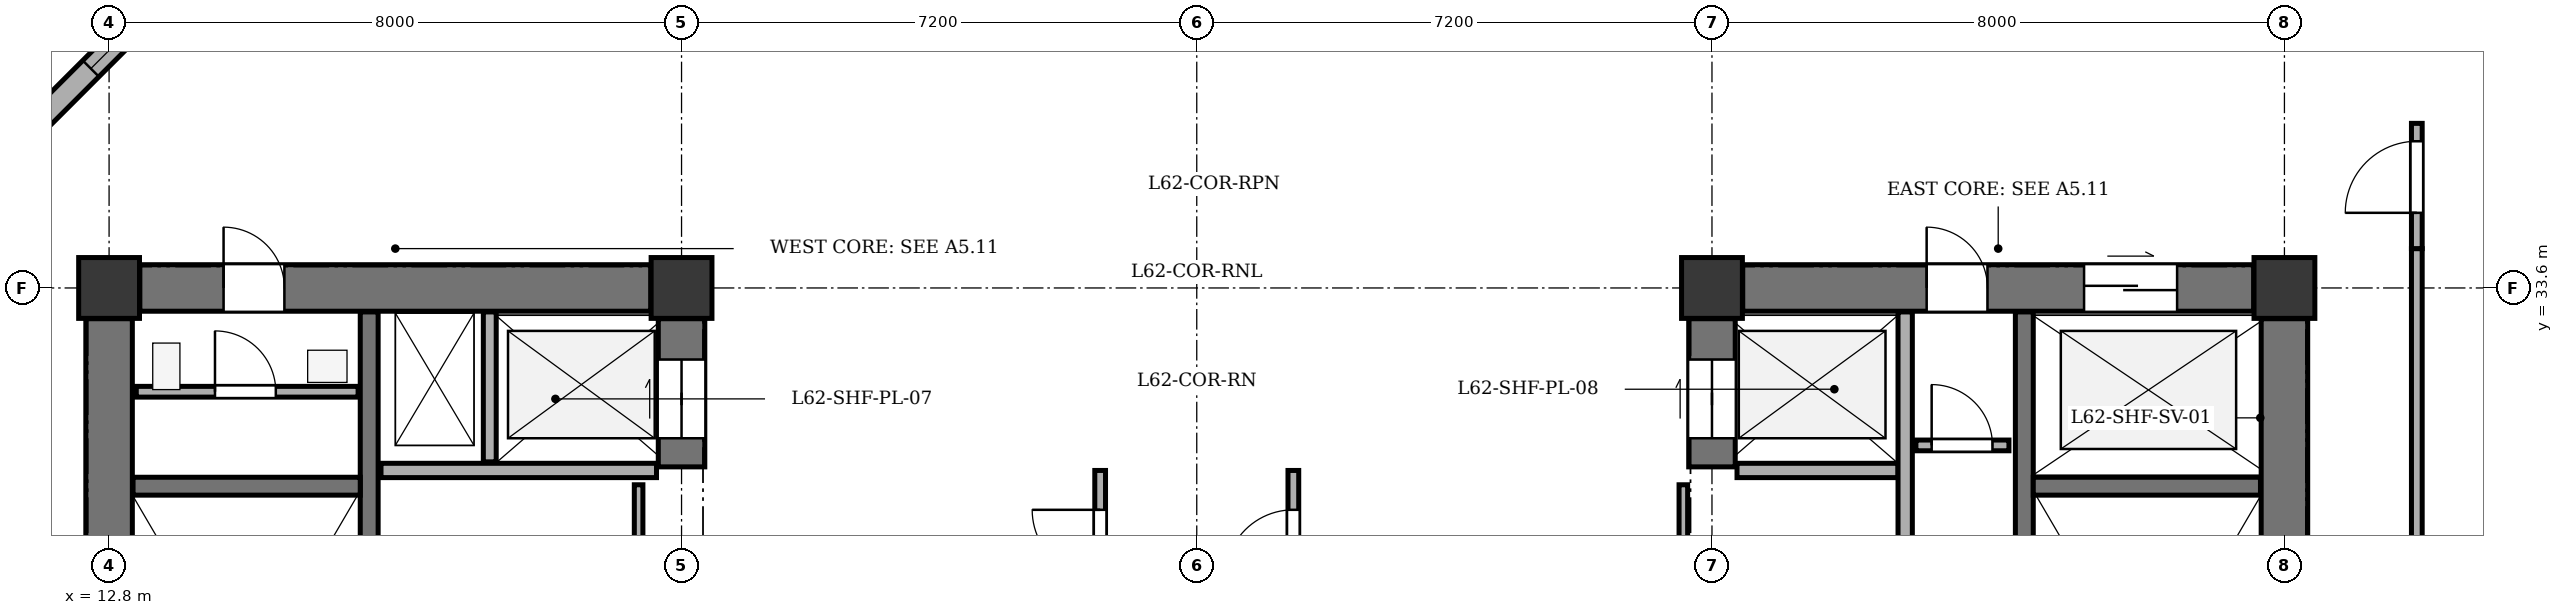
"""IFC4 building model, lengths in metres.
Left out: names, types, materials, properties, quantities, classifications, styles, units other than length and angle.
Written with IfcOpenShell. Run it as: python <this file> out.ifc"""

import sys

from ifc_helpers import new_model, si_unit, direction, frame, frame_2d, origin, origin_2d, place, context, subcontext, project, spatial, rectangle, extrude, element, fill, save


model = new_model("IFC4")
c1 = context("Model", 3, precision=1e-05, world=origin(), true_north=direction((0.0, 1.0)))
c2 = subcontext(c1, "Body", "Model", "MODEL_VIEW")
j1 = project(units=[si_unit("LENGTHUNIT", "METRE"), si_unit("PLANEANGLEUNIT", "RADIAN")], contexts=[c1])
p1 = place(None, origin())
s1 = spatial("IfcSite", under=j1, at=p1, CompositionType="ELEMENT")
p2 = place(p1, origin())
s2 = spatial("IfcBuilding", under=s1, at=p2, CompositionType="ELEMENT")
p3 = place(p2, frame((0.0, 0.0, 238.1)))
s3 = spatial("IfcBuildingStorey", under=s2, at=p3, CompositionType="ELEMENT", Elevation=238.1)
for number, where, z_axis, x_axis in (
    (1, (12.8, 33.6, 0.0), (0.0, 0.0, 1.0), (1.0, 0.0, 0.0)),
    (2, (20.8, 33.6, 0.0), (0.0, 0.0, 1.0), (1.0, 0.0, 0.0)),
    (3, (35.2, 33.6, 0.0), (0.0, 0.0, 1.0), (1.0, 0.0, 0.0)),
    (4, (43.2, 33.6, 0.0), (0.0, 0.0, 1.0), (1.0, 0.0, 0.0)),
):
    element("IfcColumn", number, at=place(p3, frame(where, z_axis=z_axis, x_axis=x_axis)), inside=s3, PredefinedType="COLUMN", context=c2, shape_type="SweptSolid", body=[
        extrude(rectangle(XDim=0.85, YDim=0.85, at=origin_2d()), origin(), (0.0, 0.0, 1.0), 3.4),
    ])
p4 = place(p3, frame((10.88, 35.0, 0.0), z_axis=(0.0, 0.0, 1.0), x_axis=(0.707106781187, 0.707106781187, 0.0)))
e5 = element("IfcWall", 5, at=p4, inside=s3, PredefinedType="STANDARD", context=c2, shape_type="SweptSolid", body=[
    extrude(rectangle(XDim=6.11, YDim=0.32, at=frame_2d((3.055, 0.0))), origin(), (0.0, 0.0, 1.0), 2.725),
])
p5 = place(p4, frame((2.355, 0.0, 0.75)))
e6 = element("IfcOpeningElement", 6, at=p5, cuts=e5, PredefinedType="OPENING", context=c2, shape_type="SweptSolid", body=[
    extrude(rectangle(XDim=1.4, YDim=1.65, at=frame_2d((0.7, 0.825))), frame((0.0, 0.17, 0.0), z_axis=(0.0, -1.0, 0.0), x_axis=(1.0, 0.0, 0.0)), (0.0, 0.0, 1.0), 0.34),
])
p6 = place(p3, frame((12.8, 21.23, 0.0), z_axis=(0.0, 0.0, 1.0), x_axis=(0.0, 1.0, 0.0)))
e7 = element("IfcWall", 7, at=p6, inside=s3, PredefinedType="SHEAR", context=c2, shape_type="SweptSolid", body=[
    extrude(rectangle(XDim=11.94, YDim=0.65, at=frame_2d((5.97, 0.0))), origin(), (0.0, 0.0, 1.0), 3.1),
])
p7 = place(p3, frame((13.23, 33.6, 0.0), z_axis=(0.0, 0.0, 1.0), x_axis=(1.0, 0.0, 0.0)))
e8 = element("IfcWall", 8, at=p7, inside=s3, PredefinedType="SHEAR", context=c2, shape_type="SweptSolid", body=[
    extrude(rectangle(XDim=7.14, YDim=0.65, at=frame_2d((3.57, 0.0))), origin(), (0.0, 0.0, 1.0), 3.1),
])
p8 = place(p7, frame((1.17, 0.0, 0.0)))
e9 = element("IfcOpeningElement", 9, at=p8, cuts=e8, PredefinedType="OPENING", context=c2, shape_type="SweptSolid", body=[
    extrude(rectangle(XDim=0.85, YDim=2.02, at=frame_2d((0.425, 1.01))), frame((0.0, 0.335, 0.0), z_axis=(0.0, -1.0, 0.0), x_axis=(1.0, 0.0, 0.0)), (0.0, 0.0, 1.0), 0.67),
])
p9 = place(p3, frame((20.8, 31.1, 0.0), z_axis=(0.0, 0.0, 1.0), x_axis=(0.0, 1.0, 0.0)))
e10 = element("IfcWall", 10, at=p9, inside=s3, PredefinedType="SHEAR", context=c2, shape_type="SweptSolid", body=[
    extrude(rectangle(XDim=2.07, YDim=0.65, at=frame_2d((1.035, 0.0))), origin(), (0.0, 0.0, 1.0), 3.1),
])
p10 = place(p9, frame((0.4, 0.0, 0.0)))
e11 = element("IfcOpeningElement", 11, at=p10, cuts=e10, PredefinedType="OPENING", context=c2, shape_type="SweptSolid", body=[
    extrude(rectangle(XDim=1.1, YDim=2.1, at=frame_2d((0.55, 1.05))), frame((0.0, 0.335, 0.0), z_axis=(0.0, -1.0, 0.0), x_axis=(1.0, 0.0, 0.0)), (0.0, 0.0, 1.0), 0.67),
])
p11 = place(p3, frame((16.435, 21.135, 0.0), z_axis=(0.0, 0.0, 1.0), x_axis=(0.0, 1.0, 0.0)))
e12 = element("IfcWall", 12, at=p11, inside=s3, PredefinedType="SHEAR", context=c2, shape_type="SweptSolid", body=[
    extrude(rectangle(XDim=12.13, YDim=0.25, at=frame_2d((6.065, 0.0))), origin(), (0.0, 0.0, 1.0), 3.1),
])
p12 = place(p11, frame((0.515, 0.0, 0.0)))
e13 = element("IfcOpeningElement", 13, at=p12, cuts=e12, PredefinedType="OPENING", context=c2, shape_type="SweptSolid", body=[
    extrude(rectangle(XDim=1.2, YDim=2.15, at=frame_2d((0.6, 1.075))), frame((0.0, 0.135, 0.0), z_axis=(0.0, -1.0, 0.0), x_axis=(1.0, 0.0, 0.0)), (0.0, 0.0, 1.0), 0.27),
])
p13 = place(p11, frame((2.665, 0.0, 0.0)))
e14 = element("IfcOpeningElement", 14, at=p13, cuts=e12, PredefinedType="OPENING", context=c2, shape_type="SweptSolid", body=[
    extrude(rectangle(XDim=1.15, YDim=2.15, at=frame_2d((0.575, 1.075))), frame((0.0, 0.135, 0.0), z_axis=(0.0, -1.0, 0.0), x_axis=(1.0, 0.0, 0.0)), (0.0, 0.0, 1.0), 0.27),
])
p14 = place(p3, frame((13.135, 30.83, 0.0), z_axis=(0.0, 0.0, 1.0), x_axis=(1.0, 0.0, 0.0)))
e15 = element("IfcWall", 15, at=p14, inside=s3, PredefinedType="SHEAR", context=c2, shape_type="SweptSolid", body=[
    extrude(rectangle(XDim=3.175, YDim=0.25, at=frame_2d((1.587, 0.0))), origin(), (0.0, 0.0, 1.0), 3.1),
])
p15 = place(p3, frame((16.6, 31.05, 0.0), z_axis=(0.0, 0.0, 1.0), x_axis=(1.0, 0.0, 0.0)))
e16 = element("IfcWall", 16, at=p15, inside=s3, PredefinedType="SOLIDWALL", context=c2, shape_type="SweptSolid", body=[
    extrude(rectangle(XDim=3.85, YDim=0.2, at=frame_2d((1.925, 0.0))), origin(), (0.0, 0.0, 1.0), 3.1),
])
p16 = place(p3, frame((18.12, 31.17, 0.0), z_axis=(0.0, 0.0, 1.0), x_axis=(0.0, 1.0, 0.0)))
e17 = element("IfcWall", 17, at=p16, inside=s3, PredefinedType="PARTITIONING", context=c2, shape_type="SweptSolid", body=[
    extrude(rectangle(XDim=2.095, YDim=0.18, at=frame_2d((1.047, 0.0))), origin(), (0.0, 0.0, 1.0), 3.1),
])
p17 = place(p3, frame((43.2, 21.23, 0.0), z_axis=(0.0, 0.0, 1.0), x_axis=(0.0, 1.0, 0.0)))
e18 = element("IfcWall", 18, at=p17, inside=s3, PredefinedType="SHEAR", context=c2, shape_type="SweptSolid", body=[
    extrude(rectangle(XDim=11.94, YDim=0.65, at=frame_2d((5.97, 0.0))), origin(), (0.0, 0.0, 1.0), 3.1),
])
p18 = place(p3, frame((35.63, 33.6, 0.0), z_axis=(0.0, 0.0, 1.0), x_axis=(1.0, 0.0, 0.0)))
e19 = element("IfcWall", 19, at=p18, inside=s3, PredefinedType="SHEAR", context=c2, shape_type="SweptSolid", body=[
    extrude(rectangle(XDim=7.14, YDim=0.65, at=frame_2d((3.57, 0.0))), origin(), (0.0, 0.0, 1.0), 3.1),
])
p19 = place(p18, frame((4.77, 0.0, 0.0)))
e20 = element("IfcOpeningElement", 20, at=p19, cuts=e19, PredefinedType="OPENING", context=c2, shape_type="SweptSolid", body=[
    extrude(rectangle(XDim=1.3, YDim=2.15, at=frame_2d((0.65, 1.075))), frame((0.0, 0.335, 0.0), z_axis=(0.0, -1.0, 0.0), x_axis=(1.0, 0.0, 0.0)), (0.0, 0.0, 1.0), 0.67),
])
p20 = place(p18, frame((2.57, 0.0, 0.0)))
e21 = element("IfcOpeningElement", 21, at=p20, cuts=e19, PredefinedType="OPENING", context=c2, shape_type="SweptSolid", body=[
    extrude(rectangle(XDim=0.85, YDim=2.02, at=frame_2d((0.425, 1.01))), frame((0.0, 0.335, 0.0), z_axis=(0.0, -1.0, 0.0), x_axis=(1.0, 0.0, 0.0)), (0.0, 0.0, 1.0), 0.67),
])
p21 = place(p3, frame((35.2, 31.1, 0.0), z_axis=(0.0, 0.0, 1.0), x_axis=(0.0, 1.0, 0.0)))
e22 = element("IfcWall", 22, at=p21, inside=s3, PredefinedType="SHEAR", context=c2, shape_type="SweptSolid", body=[
    extrude(rectangle(XDim=2.07, YDim=0.65, at=frame_2d((1.035, 0.0))), origin(), (0.0, 0.0, 1.0), 3.1),
])
p22 = place(p21, frame((0.4, 0.0, 0.0)))
e23 = element("IfcOpeningElement", 23, at=p22, cuts=e22, PredefinedType="OPENING", context=c2, shape_type="SweptSolid", body=[
    extrude(rectangle(XDim=1.1, YDim=2.1, at=frame_2d((0.55, 1.05))), frame((0.0, 0.335, 0.0), z_axis=(0.0, -1.0, 0.0), x_axis=(1.0, 0.0, 0.0)), (0.0, 0.0, 1.0), 0.67),
])
p23 = place(p3, frame((39.565, 21.135, 0.0), z_axis=(0.0, 0.0, 1.0), x_axis=(0.0, 1.0, 0.0)))
e24 = element("IfcWall", 24, at=p23, inside=s3, PredefinedType="SHEAR", context=c2, shape_type="SweptSolid", body=[
    extrude(rectangle(XDim=12.13, YDim=0.25, at=frame_2d((6.065, 0.0))), origin(), (0.0, 0.0, 1.0), 3.1),
])
p24 = place(p23, frame((0.515, 0.0, 0.0)))
e25 = element("IfcOpeningElement", 25, at=p24, cuts=e24, PredefinedType="OPENING", context=c2, shape_type="SweptSolid", body=[
    extrude(rectangle(XDim=1.2, YDim=2.15, at=frame_2d((0.6, 1.075))), frame((0.0, 0.135, 0.0), z_axis=(0.0, -1.0, 0.0), x_axis=(1.0, 0.0, 0.0)), (0.0, 0.0, 1.0), 0.27),
])
p25 = place(p23, frame((2.665, 0.0, 0.0)))
e26 = element("IfcOpeningElement", 26, at=p25, cuts=e24, PredefinedType="OPENING", context=c2, shape_type="SweptSolid", body=[
    extrude(rectangle(XDim=1.15, YDim=2.15, at=frame_2d((0.575, 1.075))), frame((0.0, 0.135, 0.0), z_axis=(0.0, -1.0, 0.0), x_axis=(1.0, 0.0, 0.0)), (0.0, 0.0, 1.0), 0.27),
])
p26 = place(p3, frame((39.69, 30.83, 0.0), z_axis=(0.0, 0.0, 1.0), x_axis=(1.0, 0.0, 0.0)))
e27 = element("IfcWall", 27, at=p26, inside=s3, PredefinedType="SHEAR", context=c2, shape_type="SweptSolid", body=[
    extrude(rectangle(XDim=3.175, YDim=0.25, at=frame_2d((1.587, 0.0))), origin(), (0.0, 0.0, 1.0), 3.1),
])
p27 = place(p3, frame((35.55, 31.05, 0.0), z_axis=(0.0, 0.0, 1.0), x_axis=(1.0, 0.0, 0.0)))
e28 = element("IfcWall", 28, at=p27, inside=s3, PredefinedType="SOLIDWALL", context=c2, shape_type="SweptSolid", body=[
    extrude(rectangle(XDim=2.25, YDim=0.2, at=frame_2d((1.125, 0.0))), origin(), (0.0, 0.0, 1.0), 3.1),
])
p28 = place(p3, frame((37.9, 25.27, 0.0), z_axis=(0.0, 0.0, 1.0), x_axis=(0.0, 1.0, 0.0)))
e29 = element("IfcWall", 29, at=p28, inside=s3, PredefinedType="SOLIDWALL", context=c2, shape_type="SweptSolid", body=[
    extrude(rectangle(XDim=7.995, YDim=0.2, at=frame_2d((3.998, 0.0))), origin(), (0.0, 0.0, 1.0), 3.1),
])
p29 = place(p3, frame((13.18, 32.15, 0.0), z_axis=(0.0, 0.0, 1.0), x_axis=(1.0, 0.0, 0.0)))
e30 = element("IfcWall", 30, at=p29, inside=s3, PredefinedType="PARTITIONING", context=c2, shape_type="SweptSolid", body=[
    extrude(rectangle(XDim=3.1, YDim=0.15, at=frame_2d((1.55, 0.0))), origin(), (0.0, 0.0, 1.0), 3.1),
])
p30 = place(p29, frame((1.1, 0.0, 0.0)))
e31 = element("IfcOpeningElement", 31, at=p30, cuts=e30, PredefinedType="OPENING", context=c2, shape_type="SweptSolid", body=[
    extrude(rectangle(XDim=0.85, YDim=2.02, at=frame_2d((0.425, 1.01))), frame((0.0, 0.085, 0.0), z_axis=(0.0, -1.0, 0.0), x_axis=(1.0, 0.0, 0.0)), (0.0, 0.0, 1.0), 0.17),
])
p31 = place(p3, frame((38.05, 31.4, 0.0), z_axis=(0.0, 0.0, 1.0), x_axis=(1.0, 0.0, 0.0)))
e32 = element("IfcWall", 32, at=p31, inside=s3, PredefinedType="PARTITIONING", context=c2, shape_type="SweptSolid", body=[
    extrude(rectangle(XDim=1.3, YDim=0.15, at=frame_2d((0.65, 0.0))), origin(), (0.0, 0.0, 1.0), 3.1),
])
p32 = place(p31, frame((0.22, 0.0, 0.0)))
e33 = element("IfcOpeningElement", 33, at=p32, cuts=e32, PredefinedType="OPENING", context=c2, shape_type="SweptSolid", body=[
    extrude(rectangle(XDim=0.85, YDim=2.02, at=frame_2d((0.425, 1.01))), frame((0.0, 0.085, 0.0), z_axis=(0.0, -1.0, 0.0), x_axis=(1.0, 0.0, 0.0)), (0.0, 0.0, 1.0), 0.17),
])
p33 = place(p3, frame((26.65, 25.23, 0.0), z_axis=(0.0, 0.0, 1.0), x_axis=(0.0, 1.0, 0.0)))
e34 = element("IfcWall", 34, at=p33, inside=s3, PredefinedType="PARTITIONING", context=c2, shape_type="SweptSolid", body=[
    extrude(rectangle(XDim=5.82, YDim=0.15, at=frame_2d((2.91, 0.0))), origin(), (0.0, 0.0, 1.0), 3.1),
])
p34 = place(p33, frame((1.42, 0.0, 0.0)))
e35 = element("IfcOpeningElement", 35, at=p34, cuts=e34, PredefinedType="OPENING", context=c2, shape_type="SweptSolid", body=[
    extrude(rectangle(XDim=0.95, YDim=2.1, at=frame_2d((0.475, 1.05))), frame((0.0, 0.085, 0.0), z_axis=(0.0, -1.0, 0.0), x_axis=(1.0, 0.0, 0.0)), (0.0, 0.0, 1.0), 0.17),
])
p35 = place(p33, frame((4.32, 0.0, 0.0)))
e36 = element("IfcOpeningElement", 36, at=p35, cuts=e34, PredefinedType="OPENING", context=c2, shape_type="SweptSolid", body=[
    extrude(rectangle(XDim=0.95, YDim=2.1, at=frame_2d((0.475, 1.05))), frame((0.0, 0.085, 0.0), z_axis=(0.0, -1.0, 0.0), x_axis=(1.0, 0.0, 0.0)), (0.0, 0.0, 1.0), 0.17),
])
p36 = place(p3, frame((20.2, 25.255, 0.0), z_axis=(0.0, 0.0, 1.0), x_axis=(0.0, 1.0, 0.0)))
e37 = element("IfcWall", 37, at=p36, inside=s3, PredefinedType="PARTITIONING", context=c2, shape_type="SweptSolid", body=[
    extrude(rectangle(XDim=5.595, YDim=0.12, at=frame_2d((2.798, 0.0))), origin(), (0.0, 0.0, 1.0), 3.1),
])
p37 = place(p36, frame((0.995, 0.0, 0.0)))
e38 = element("IfcOpeningElement", 38, at=p37, cuts=e37, PredefinedType="OPENING", context=c2, shape_type="SweptSolid", body=[
    extrude(rectangle(XDim=0.9, YDim=2.05, at=frame_2d((0.45, 1.025))), frame((0.0, 0.07, 0.0), z_axis=(0.0, -1.0, 0.0), x_axis=(1.0, 0.0, 0.0)), (0.0, 0.0, 1.0), 0.14),
])
p38 = place(p3, frame((29.35, 25.23, 0.0), z_axis=(0.0, 0.0, 1.0), x_axis=(0.0, 1.0, 0.0)))
e39 = element("IfcWall", 39, at=p38, inside=s3, PredefinedType="PARTITIONING", context=c2, shape_type="SweptSolid", body=[
    extrude(rectangle(XDim=5.82, YDim=0.15, at=frame_2d((2.91, 0.0))), origin(), (0.0, 0.0, 1.0), 3.1),
])
p39 = place(p38, frame((1.42, 0.0, 0.0)))
e40 = element("IfcOpeningElement", 40, at=p39, cuts=e39, PredefinedType="OPENING", context=c2, shape_type="SweptSolid", body=[
    extrude(rectangle(XDim=0.95, YDim=2.1, at=frame_2d((0.475, 1.05))), frame((0.0, 0.085, 0.0), z_axis=(0.0, -1.0, 0.0), x_axis=(1.0, 0.0, 0.0)), (0.0, 0.0, 1.0), 0.17),
])
p40 = place(p38, frame((4.32, 0.0, 0.0)))
e41 = element("IfcOpeningElement", 41, at=p40, cuts=e39, PredefinedType="OPENING", context=c2, shape_type="SweptSolid", body=[
    extrude(rectangle(XDim=0.95, YDim=2.1, at=frame_2d((0.475, 1.05))), frame((0.0, 0.085, 0.0), z_axis=(0.0, -1.0, 0.0), x_axis=(1.0, 0.0, 0.0)), (0.0, 0.0, 1.0), 0.17),
])
p41 = place(p3, frame((34.8, 25.25, 0.0), z_axis=(0.0, 0.0, 1.0), x_axis=(0.0, 1.0, 0.0)))
e42 = element("IfcWall", 42, at=p41, inside=s3, PredefinedType="PARTITIONING", context=c2, shape_type="SweptSolid", body=[
    extrude(rectangle(XDim=5.6, YDim=0.12, at=frame_2d((2.8, 0.0))), origin(), (0.0, 0.0, 1.0), 3.1),
])
p42 = place(p41, frame((1.0, 0.0, 0.0)))
e43 = element("IfcOpeningElement", 43, at=p42, cuts=e42, PredefinedType="OPENING", context=c2, shape_type="SweptSolid", body=[
    extrude(rectangle(XDim=0.9, YDim=2.05, at=frame_2d((0.45, 1.025))), frame((0.0, 0.07, 0.0), z_axis=(0.0, -1.0, 0.0), x_axis=(1.0, 0.0, 0.0)), (0.0, 0.0, 1.0), 0.14),
])
p43 = place(p3, frame((45.05, 20.25, 0.0), z_axis=(0.0, 0.0, 1.0), x_axis=(0.0, 1.0, 0.0)))
e44 = element("IfcWall", 44, at=p43, inside=s3, PredefinedType="PARTITIONING", context=c2, shape_type="SweptSolid", body=[
    extrude(rectangle(XDim=13.9, YDim=0.15, at=frame_2d((6.95, 0.0))), origin(), (0.0, 0.0, 1.0), 2.725),
])
p44 = place(p3, frame((45.05, 34.15, 0.0), z_axis=(0.0, 0.0, 1.0), x_axis=(0.0, 1.0, 0.0)))
e45 = element("IfcWall", 45, at=p44, inside=s3, PredefinedType="PARTITIONING", context=c2, shape_type="SweptSolid", body=[
    extrude(rectangle(XDim=1.75, YDim=0.15, at=frame_2d((0.875, 0.0))), origin(), (0.0, 0.0, 1.0), 2.725),
])
p45 = place(p44, frame((0.5, 0.0, 0.0)))
e46 = element("IfcOpeningElement", 46, at=p45, cuts=e45, PredefinedType="OPENING", context=c2, shape_type="SweptSolid", body=[
    extrude(rectangle(XDim=1.0, YDim=2.1, at=frame_2d((0.5, 1.05))), frame((0.0, 0.085, 0.0), z_axis=(0.0, -1.0, 0.0), x_axis=(1.0, 0.0, 0.0)), (0.0, 0.0, 1.0), 0.17),
])
p46 = place(p5, origin())
e47 = element("IfcWindow", 47, at=p46, inside=s3, PartitioningType="SINGLE_PANEL", PredefinedType="WINDOW", context=c2, shape_type="SweptSolid", body=[
    extrude(rectangle(XDim=1.4, YDim=1.65, at=frame_2d((0.7, 0.825))), frame((0.0, -0.01, 0.0), z_axis=(0.0, -1.0, 0.0), x_axis=(1.0, 0.0, 0.0)), (0.0, 0.0, 1.0), 0.06),
])
fill(e6, e47)
p47 = place(p8, origin())
e48 = element("IfcDoor", 48, at=p47, inside=s3, OperationType="SINGLE_SWING_LEFT", PredefinedType="DOOR", context=c2, shape_type="SweptSolid", body=[
    extrude(rectangle(XDim=0.85, YDim=2.02, at=frame_2d((0.425, 1.01))), frame((0.0, 0.025, 0.0), z_axis=(0.0, -1.0, 0.0), x_axis=(1.0, 0.0, 0.0)), (0.0, 0.0, 1.0), 0.05),
])
fill(e9, e48)
p48 = place(p10, origin())
e49 = element("IfcDoor", 49, at=p48, inside=s3, OperationType="DOUBLE_DOOR_SLIDING", PredefinedType="DOOR", context=c2, shape_type="SweptSolid", body=[
    extrude(rectangle(XDim=1.1, YDim=2.1, at=frame_2d((0.55, 1.05))), frame((0.0, 0.025, 0.0), z_axis=(0.0, -1.0, 0.0), x_axis=(1.0, 0.0, 0.0)), (0.0, 0.0, 1.0), 0.05),
])
fill(e11, e49)
p49 = place(p19, origin())
e50 = element("IfcDoor", 50, at=p49, inside=s3, OperationType="DOUBLE_DOOR_SLIDING", PredefinedType="DOOR", context=c2, shape_type="SweptSolid", body=[
    extrude(rectangle(XDim=1.3, YDim=2.15, at=frame_2d((0.65, 1.075))), frame((0.0, 0.025, 0.0), z_axis=(0.0, -1.0, 0.0), x_axis=(1.0, 0.0, 0.0)), (0.0, 0.0, 1.0), 0.05),
])
fill(e20, e50)
p50 = place(p20, origin())
e51 = element("IfcDoor", 51, at=p50, inside=s3, OperationType="SINGLE_SWING_LEFT", PredefinedType="DOOR", context=c2, shape_type="SweptSolid", body=[
    extrude(rectangle(XDim=0.85, YDim=2.02, at=frame_2d((0.425, 1.01))), frame((0.0, 0.025, 0.0), z_axis=(0.0, -1.0, 0.0), x_axis=(1.0, 0.0, 0.0)), (0.0, 0.0, 1.0), 0.05),
])
fill(e21, e51)
p51 = place(p22, origin())
e52 = element("IfcDoor", 52, at=p51, inside=s3, OperationType="DOUBLE_DOOR_SLIDING", PredefinedType="DOOR", context=c2, shape_type="SweptSolid", body=[
    extrude(rectangle(XDim=1.1, YDim=2.1, at=frame_2d((0.55, 1.05))), frame((0.0, 0.025, 0.0), z_axis=(0.0, -1.0, 0.0), x_axis=(1.0, 0.0, 0.0)), (0.0, 0.0, 1.0), 0.05),
])
fill(e23, e52)
p52 = place(p30, origin())
e53 = element("IfcDoor", 53, at=p52, inside=s3, OperationType="SINGLE_SWING_LEFT", PredefinedType="DOOR", context=c2, shape_type="SweptSolid", body=[
    extrude(rectangle(XDim=0.85, YDim=2.02, at=frame_2d((0.425, 1.01))), frame((0.0, 0.025, 0.0), z_axis=(0.0, -1.0, 0.0), x_axis=(1.0, 0.0, 0.0)), (0.0, 0.0, 1.0), 0.05),
])
fill(e31, e53)
p53 = place(p32, origin())
e54 = element("IfcDoor", 54, at=p53, inside=s3, OperationType="SINGLE_SWING_LEFT", PredefinedType="DOOR", context=c2, shape_type="SweptSolid", body=[
    extrude(rectangle(XDim=0.85, YDim=2.02, at=frame_2d((0.425, 1.01))), frame((0.0, 0.025, 0.0), z_axis=(0.0, -1.0, 0.0), x_axis=(1.0, 0.0, 0.0)), (0.0, 0.0, 1.0), 0.05),
])
fill(e33, e54)
p54 = place(p35, origin())
e55 = element("IfcDoor", 55, at=p54, inside=s3, OperationType="SINGLE_SWING_RIGHT", PredefinedType="DOOR", context=c2, shape_type="SweptSolid", body=[
    extrude(rectangle(XDim=0.95, YDim=2.1, at=frame_2d((0.475, 1.05))), frame((0.0, 0.025, 0.0), z_axis=(0.0, -1.0, 0.0), x_axis=(1.0, 0.0, 0.0)), (0.0, 0.0, 1.0), 0.05),
])
fill(e36, e55)
p55 = place(p40, origin())
e56 = element("IfcDoor", 56, at=p55, inside=s3, OperationType="SINGLE_SWING_LEFT", PredefinedType="DOOR", context=c2, shape_type="SweptSolid", body=[
    extrude(rectangle(XDim=0.95, YDim=2.1, at=frame_2d((0.475, 1.05))), frame((0.0, 0.025, 0.0), z_axis=(0.0, -1.0, 0.0), x_axis=(1.0, 0.0, 0.0)), (0.0, 0.0, 1.0), 0.05),
])
fill(e41, e56)
p56 = place(p45, origin())
e57 = element("IfcDoor", 57, at=p56, inside=s3, OperationType="SINGLE_SWING_LEFT", PredefinedType="DOOR", context=c2, shape_type="SweptSolid", body=[
    extrude(rectangle(XDim=1.0, YDim=2.1, at=frame_2d((0.5, 1.05))), frame((0.0, 0.025, 0.0), z_axis=(0.0, -1.0, 0.0), x_axis=(1.0, 0.0, 0.0)), (0.0, 0.0, 1.0), 0.05),
])
fill(e46, e57)
save(model, sys.argv[1])
